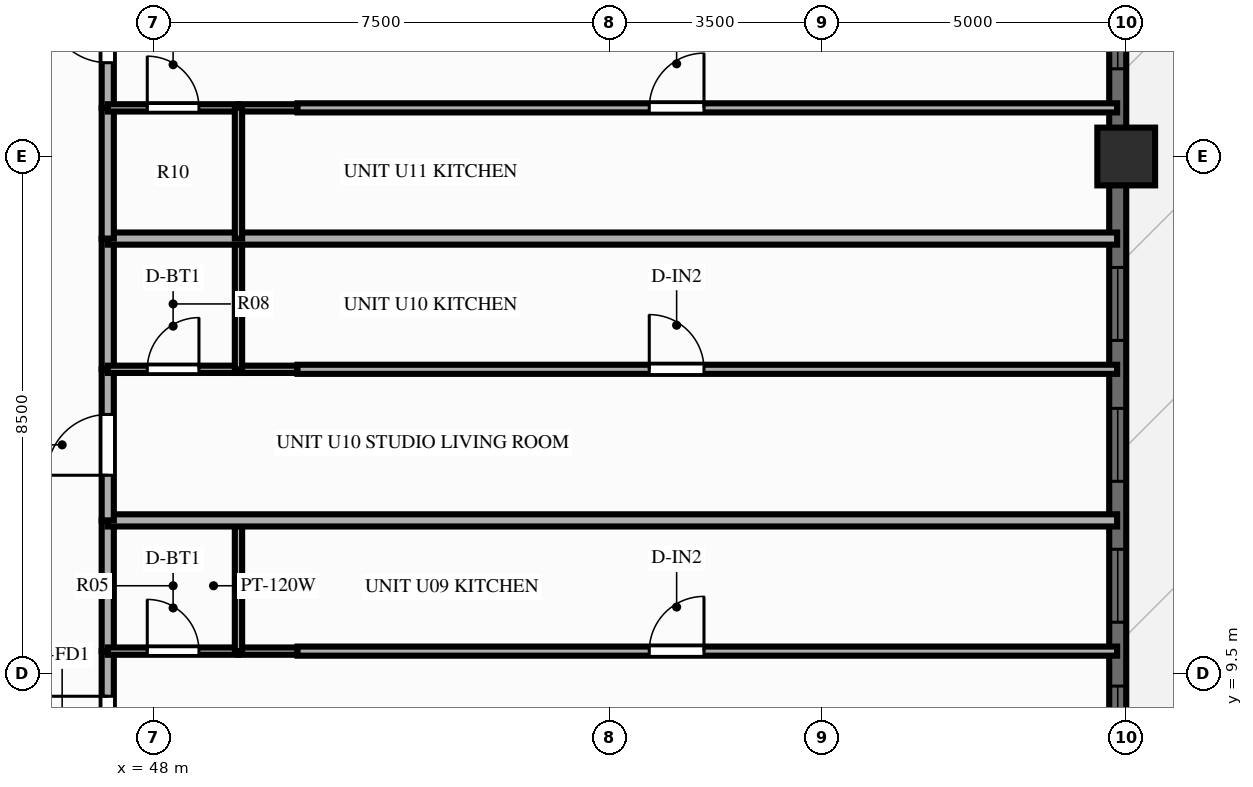
"""IFC4 building model, lengths in metres.
Left out: names, types, materials, properties, quantities, classifications, styles, units other than length and angle.
Written with IfcOpenShell. Run it as: python <this file> out.ifc"""

import sys

from ifc_helpers import new_model, si_unit, direction, frame, frame_2d, origin, origin_2d, place, context, subcontext, project, spatial, rectangle, extrude, source, transform, mapped, element, fill, save


model = new_model("IFC4")
c1 = context("Model", 3, precision=1e-05, world=origin(), true_north=direction((0.0, 1.0)))
c2 = subcontext(c1, "Body", "Model", "MODEL_VIEW")
j1 = project(units=[si_unit("LENGTHUNIT", "METRE"), si_unit("PLANEANGLEUNIT", "RADIAN")], contexts=[c1])
p1 = place(None, origin())
s1 = spatial("IfcSite", under=j1, at=p1, CompositionType="ELEMENT")
p2 = place(p1, origin())
s2 = spatial("IfcBuilding", under=s1, at=p2, CompositionType="ELEMENT")
p3 = place(p2, frame((0.0, 0.0, 122.85)))
s3 = spatial("IfcBuildingStorey", under=s2, at=p3, CompositionType="ELEMENT", Elevation=122.85)
m1 = source(origin(), c2, "Body", "SweptSolid", [
    extrude(rectangle(XDim=0.95, YDim=0.95, at=origin_2d()), origin(), (0.0, 0.0, 1.0), 3.9),
])
p4 = place(p3, frame((64.0, 18.0, 0.0), z_axis=(0.0, 0.0, 1.0), x_axis=(1.0, 0.0, 0.0)))
e1 = element("IfcColumn", 1, at=p4, inside=s3, PredefinedType="COLUMN", context=c2, shape_type="MappedRepresentation", body=[
    mapped(m1, transform((0.0, 0.0, 0.0), scale=1.0)),
])
p5 = place(p3, frame((63.86, 7.2, 0.0), z_axis=(0.0, 0.0, 1.0), x_axis=(0.0, 1.0, 0.0)))
e2 = element("IfcWall", 2, at=p5, inside=s3, PredefinedType="SOLIDWALL", context=c2, shape_type="SweptSolid", body=[
    extrude(rectangle(XDim=39.6, YDim=0.28, at=frame_2d((19.8, 0.0))), origin(), (0.0, 0.0, 1.0), 2.24),
])
p6 = place(p5, frame((0.89, 0.0, 0.25)))
e3 = element("IfcOpeningElement", 3, at=p6, cuts=e2, PredefinedType="OPENING", context=c2, shape_type="SweptSolid", body=[
    extrude(rectangle(XDim=1.2, YDim=1.5, at=frame_2d((0.6, 0.75))), frame((0.0, 0.152, 0.0), z_axis=(0.0, -1.0, 0.0), x_axis=(1.0, 0.0, 0.0)), (0.0, 0.0, 1.0), 0.304),
])
p7 = place(p5, frame((3.14, 0.0, 0.25)))
e4 = element("IfcOpeningElement", 4, at=p7, cuts=e2, PredefinedType="OPENING", context=c2, shape_type="SweptSolid", body=[
    extrude(rectangle(XDim=1.2, YDim=1.5, at=frame_2d((0.6, 0.75))), frame((0.0, 0.152, 0.0), z_axis=(0.0, -1.0, 0.0), x_axis=(1.0, 0.0, 0.0)), (0.0, 0.0, 1.0), 0.304),
])
p8 = place(p5, frame((5.458, 0.0, 0.25)))
e5 = element("IfcOpeningElement", 5, at=p8, cuts=e2, PredefinedType="OPENING", context=c2, shape_type="SweptSolid", body=[
    extrude(rectangle(XDim=1.2, YDim=1.5, at=frame_2d((0.6, 0.75))), frame((0.0, 0.152, 0.0), z_axis=(0.0, -1.0, 0.0), x_axis=(1.0, 0.0, 0.0)), (0.0, 0.0, 1.0), 0.304),
])
p9 = place(p5, frame((7.775, 0.0, 0.25)))
e6 = element("IfcOpeningElement", 6, at=p9, cuts=e2, PredefinedType="OPENING", context=c2, shape_type="SweptSolid", body=[
    extrude(rectangle(XDim=1.2, YDim=1.5, at=frame_2d((0.6, 0.75))), frame((0.0, 0.152, 0.0), z_axis=(0.0, -1.0, 0.0), x_axis=(1.0, 0.0, 0.0)), (0.0, 0.0, 1.0), 0.304),
])
p10 = place(p5, frame((12.242, 0.0, 0.25)))
e7 = element("IfcOpeningElement", 7, at=p10, cuts=e2, PredefinedType="OPENING", context=c2, shape_type="SweptSolid", body=[
    extrude(rectangle(XDim=1.2, YDim=1.5, at=frame_2d((0.6, 0.75))), frame((0.0, 0.152, 0.0), z_axis=(0.0, -1.0, 0.0), x_axis=(1.0, 0.0, 0.0)), (0.0, 0.0, 1.0), 0.304),
])
p11 = place(p5, frame((14.56, 0.0, 0.25)))
e8 = element("IfcOpeningElement", 8, at=p11, cuts=e2, PredefinedType="OPENING", context=c2, shape_type="SweptSolid", body=[
    extrude(rectangle(XDim=1.2, YDim=1.5, at=frame_2d((0.6, 0.75))), frame((0.0, 0.152, 0.0), z_axis=(0.0, -1.0, 0.0), x_axis=(1.0, 0.0, 0.0)), (0.0, 0.0, 1.0), 0.304),
])
p12 = place(p5, frame((16.877, 0.0, 0.25)))
e9 = element("IfcOpeningElement", 9, at=p12, cuts=e2, PredefinedType="OPENING", context=c2, shape_type="SweptSolid", body=[
    extrude(rectangle(XDim=1.2, YDim=1.5, at=frame_2d((0.6, 0.75))), frame((0.0, 0.152, 0.0), z_axis=(0.0, -1.0, 0.0), x_axis=(1.0, 0.0, 0.0)), (0.0, 0.0, 1.0), 0.304),
])
p13 = place(p5, frame((20.35, 0.0, 0.0), z_axis=(0.0, 0.0, 1.0), x_axis=(-1.0, 0.0, 0.0)))
e10 = element("IfcOpeningElement", 10, at=p13, cuts=e2, PredefinedType="OPENING", context=c2, shape_type="SweptSolid", body=[
    extrude(rectangle(XDim=1.1, YDim=2.15, at=frame_2d((0.55, 1.075))), frame((0.0, 0.152, 0.0), z_axis=(0.0, -1.0, 0.0), x_axis=(1.0, 0.0, 0.0)), (0.0, 0.0, 1.0), 0.304),
])
p14 = place(p5, frame((21.522, 0.0, 0.25)))
e11 = element("IfcOpeningElement", 11, at=p14, cuts=e2, PredefinedType="OPENING", context=c2, shape_type="SweptSolid", body=[
    extrude(rectangle(XDim=1.2, YDim=1.5, at=frame_2d((0.6, 0.75))), frame((0.0, 0.152, 0.0), z_axis=(0.0, -1.0, 0.0), x_axis=(1.0, 0.0, 0.0)), (0.0, 0.0, 1.0), 0.304),
])
p15 = place(p5, frame((23.84, 0.0, 0.25)))
e12 = element("IfcOpeningElement", 12, at=p15, cuts=e2, PredefinedType="OPENING", context=c2, shape_type="SweptSolid", body=[
    extrude(rectangle(XDim=1.2, YDim=1.5, at=frame_2d((0.6, 0.75))), frame((0.0, 0.152, 0.0), z_axis=(0.0, -1.0, 0.0), x_axis=(1.0, 0.0, 0.0)), (0.0, 0.0, 1.0), 0.304),
])
p16 = place(p5, frame((26.157, 0.0, 0.25)))
e13 = element("IfcOpeningElement", 13, at=p16, cuts=e2, PredefinedType="OPENING", context=c2, shape_type="SweptSolid", body=[
    extrude(rectangle(XDim=1.2, YDim=1.5, at=frame_2d((0.6, 0.75))), frame((0.0, 0.152, 0.0), z_axis=(0.0, -1.0, 0.0), x_axis=(1.0, 0.0, 0.0)), (0.0, 0.0, 1.0), 0.304),
])
p17 = place(p5, frame((30.625, 0.0, 0.25)))
e14 = element("IfcOpeningElement", 14, at=p17, cuts=e2, PredefinedType="OPENING", context=c2, shape_type="SweptSolid", body=[
    extrude(rectangle(XDim=1.2, YDim=1.5, at=frame_2d((0.6, 0.75))), frame((0.0, 0.152, 0.0), z_axis=(0.0, -1.0, 0.0), x_axis=(1.0, 0.0, 0.0)), (0.0, 0.0, 1.0), 0.304),
])
p18 = place(p5, frame((32.942, 0.0, 0.25)))
e15 = element("IfcOpeningElement", 15, at=p18, cuts=e2, PredefinedType="OPENING", context=c2, shape_type="SweptSolid", body=[
    extrude(rectangle(XDim=1.2, YDim=1.5, at=frame_2d((0.6, 0.75))), frame((0.0, 0.152, 0.0), z_axis=(0.0, -1.0, 0.0), x_axis=(1.0, 0.0, 0.0)), (0.0, 0.0, 1.0), 0.304),
])
p19 = place(p5, frame((35.26, 0.0, 0.25)))
e16 = element("IfcOpeningElement", 16, at=p19, cuts=e2, PredefinedType="OPENING", context=c2, shape_type="SweptSolid", body=[
    extrude(rectangle(XDim=1.2, YDim=1.5, at=frame_2d((0.6, 0.75))), frame((0.0, 0.152, 0.0), z_axis=(0.0, -1.0, 0.0), x_axis=(1.0, 0.0, 0.0)), (0.0, 0.0, 1.0), 0.304),
])
p20 = place(p5, frame((37.51, 0.0, 0.25)))
e17 = element("IfcOpeningElement", 17, at=p20, cuts=e2, PredefinedType="OPENING", context=c2, shape_type="SweptSolid", body=[
    extrude(rectangle(XDim=1.2, YDim=1.5, at=frame_2d((0.6, 0.75))), frame((0.0, 0.152, 0.0), z_axis=(0.0, -1.0, 0.0), x_axis=(1.0, 0.0, 0.0)), (0.0, 0.0, 1.0), 0.304),
])
p21 = place(p3, frame((47.25, 7.38, 0.0), z_axis=(0.0, 0.0, 1.0), x_axis=(0.0, 1.0, 0.0)))
e18 = element("IfcWall", 18, at=p21, inside=s3, PredefinedType="PARTITIONING", context=c2, shape_type="SweptSolid", body=[
    extrude(rectangle(XDim=2.485, YDim=0.2, at=frame_2d((1.243, 0.0))), origin(), (0.0, 0.0, 1.0), 3.56),
])
p22 = place(p21, frame((0.742, 0.0, 0.0)))
e19 = element("IfcOpeningElement", 19, at=p22, cuts=e18, PredefinedType="OPENING", context=c2, shape_type="SweptSolid", body=[
    extrude(rectangle(XDim=1.0, YDim=2.15, at=frame_2d((0.5, 1.075))), frame((0.0, 0.112, 0.0), z_axis=(0.0, -1.0, 0.0), x_axis=(1.0, 0.0, 0.0)), (0.0, 0.0, 1.0), 0.224),
])
p23 = place(p3, frame((47.25, 9.865, 0.0), z_axis=(0.0, 0.0, 1.0), x_axis=(0.0, 1.0, 0.0)))
e20 = element("IfcWall", 20, at=p23, inside=s3, PredefinedType="PARTITIONING", context=c2, shape_type="SweptSolid", body=[
    extrude(rectangle(XDim=2.15, YDim=0.2, at=frame_2d((1.075, 0.0))), origin(), (0.0, 0.0, 1.0), 3.56),
])
p24 = place(p3, frame((47.25, 9.865, 0.0), z_axis=(0.0, 0.0, 1.0), x_axis=(1.0, 0.0, 0.0)))
e21 = element("IfcWall", 21, at=p24, inside=s3, PredefinedType="PARTITIONING", context=c2, shape_type="SweptSolid", body=[
    extrude(rectangle(XDim=2.15, YDim=0.12, at=frame_2d((1.075, 0.0))), origin(), (0.0, 0.0, 1.0), 3.56),
])
p25 = place(p24, frame((0.65, 0.0, 0.0)))
e22 = element("IfcOpeningElement", 22, at=p25, cuts=e21, PredefinedType="OPENING", context=c2, shape_type="SweptSolid", body=[
    extrude(rectangle(XDim=0.85, YDim=2.05, at=frame_2d((0.425, 1.025))), frame((0.0, 0.072, 0.0), z_axis=(0.0, -1.0, 0.0), x_axis=(1.0, 0.0, 0.0)), (0.0, 0.0, 1.0), 0.144),
])
p26 = place(p3, frame((49.4, 9.865, 0.0), z_axis=(0.0, 0.0, 1.0), x_axis=(1.0, 0.0, 0.0)))
e23 = element("IfcWall", 23, at=p26, inside=s3, PredefinedType="PARTITIONING", context=c2, shape_type="SweptSolid", body=[
    extrude(rectangle(XDim=0.97, YDim=0.12, at=frame_2d((0.485, 0.0))), origin(), (0.0, 0.0, 1.0), 3.56),
])
p27 = place(p3, frame((49.4, 9.865, 0.0), z_axis=(0.0, 0.0, 1.0), x_axis=(0.0, 1.0, 0.0)))
e24 = element("IfcWall", 24, at=p27, inside=s3, PredefinedType="PARTITIONING", context=c2, shape_type="SweptSolid", body=[
    extrude(rectangle(XDim=2.15, YDim=0.12, at=frame_2d((1.075, 0.0))), origin(), (0.0, 0.0, 1.0), 3.56),
])
p28 = place(p3, frame((50.37, 9.865, 0.0), z_axis=(0.0, 0.0, 1.0), x_axis=(1.0, 0.0, 0.0)))
e25 = element("IfcWall", 25, at=p28, inside=s3, PredefinedType="PARTITIONING", context=c2, shape_type="SweptSolid", body=[
    extrude(rectangle(XDim=13.48, YDim=0.15, at=frame_2d((6.74, 0.0))), origin(), (0.0, 0.0, 1.0), 3.56),
])
p29 = place(p28, frame((5.786, 0.0, 0.0)))
e26 = element("IfcOpeningElement", 26, at=p29, cuts=e25, PredefinedType="OPENING", context=c2, shape_type="SweptSolid", body=[
    extrude(rectangle(XDim=0.9, YDim=2.1, at=frame_2d((0.45, 1.05))), frame((0.0, 0.087, 0.0), z_axis=(0.0, -1.0, 0.0), x_axis=(1.0, 0.0, 0.0)), (0.0, 0.0, 1.0), 0.174),
])
p30 = place(p3, frame((47.25, 12.015, 0.0), z_axis=(0.0, 0.0, 1.0), x_axis=(1.0, 0.0, 0.0)))
e27 = element("IfcWall", 27, at=p30, inside=s3, PredefinedType="PARTITIONING", context=c2, shape_type="SweptSolid", body=[
    extrude(rectangle(XDim=16.6, YDim=0.2, at=frame_2d((8.3, 0.0))), origin(), (0.0, 0.0, 1.0), 3.56),
])
p31 = place(p3, frame((47.25, 12.015, 0.0), z_axis=(0.0, 0.0, 1.0), x_axis=(0.0, 1.0, 0.0)))
e28 = element("IfcWall", 28, at=p31, inside=s3, PredefinedType="PARTITIONING", context=c2, shape_type="SweptSolid", body=[
    extrude(rectangle(XDim=2.485, YDim=0.2, at=frame_2d((1.243, 0.0))), origin(), (0.0, 0.0, 1.0), 3.56),
])
p32 = place(p31, frame((0.742, 0.0, 0.0)))
e29 = element("IfcOpeningElement", 29, at=p32, cuts=e28, PredefinedType="OPENING", context=c2, shape_type="SweptSolid", body=[
    extrude(rectangle(XDim=1.0, YDim=2.15, at=frame_2d((0.5, 1.075))), frame((0.0, 0.112, 0.0), z_axis=(0.0, -1.0, 0.0), x_axis=(1.0, 0.0, 0.0)), (0.0, 0.0, 1.0), 0.224),
])
p33 = place(p3, frame((47.25, 14.5, 0.0), z_axis=(0.0, 0.0, 1.0), x_axis=(0.0, 1.0, 0.0)))
e30 = element("IfcWall", 30, at=p33, inside=s3, PredefinedType="PARTITIONING", context=c2, shape_type="SweptSolid", body=[
    extrude(rectangle(XDim=2.15, YDim=0.2, at=frame_2d((1.075, 0.0))), origin(), (0.0, 0.0, 1.0), 3.56),
])
p34 = place(p3, frame((47.25, 14.5, 0.0), z_axis=(0.0, 0.0, 1.0), x_axis=(1.0, 0.0, 0.0)))
e31 = element("IfcWall", 31, at=p34, inside=s3, PredefinedType="PARTITIONING", context=c2, shape_type="SweptSolid", body=[
    extrude(rectangle(XDim=2.15, YDim=0.12, at=frame_2d((1.075, 0.0))), origin(), (0.0, 0.0, 1.0), 3.56),
])
p35 = place(p34, frame((0.65, 0.0, 0.0)))
e32 = element("IfcOpeningElement", 32, at=p35, cuts=e31, PredefinedType="OPENING", context=c2, shape_type="SweptSolid", body=[
    extrude(rectangle(XDim=0.85, YDim=2.05, at=frame_2d((0.425, 1.025))), frame((0.0, 0.072, 0.0), z_axis=(0.0, -1.0, 0.0), x_axis=(1.0, 0.0, 0.0)), (0.0, 0.0, 1.0), 0.144),
])
p36 = place(p3, frame((49.4, 14.5, 0.0), z_axis=(0.0, 0.0, 1.0), x_axis=(1.0, 0.0, 0.0)))
e33 = element("IfcWall", 33, at=p36, inside=s3, PredefinedType="PARTITIONING", context=c2, shape_type="SweptSolid", body=[
    extrude(rectangle(XDim=0.97, YDim=0.12, at=frame_2d((0.485, 0.0))), origin(), (0.0, 0.0, 1.0), 3.56),
])
p37 = place(p3, frame((49.4, 14.5, 0.0), z_axis=(0.0, 0.0, 1.0), x_axis=(0.0, 1.0, 0.0)))
e34 = element("IfcWall", 34, at=p37, inside=s3, PredefinedType="PARTITIONING", context=c2, shape_type="SweptSolid", body=[
    extrude(rectangle(XDim=2.15, YDim=0.12, at=frame_2d((1.075, 0.0))), origin(), (0.0, 0.0, 1.0), 3.56),
])
p38 = place(p3, frame((50.37, 14.5, 0.0), z_axis=(0.0, 0.0, 1.0), x_axis=(1.0, 0.0, 0.0)))
e35 = element("IfcWall", 35, at=p38, inside=s3, PredefinedType="PARTITIONING", context=c2, shape_type="SweptSolid", body=[
    extrude(rectangle(XDim=13.48, YDim=0.15, at=frame_2d((6.74, 0.0))), origin(), (0.0, 0.0, 1.0), 3.56),
])
p39 = place(p38, frame((5.786, 0.0, 0.0)))
e36 = element("IfcOpeningElement", 36, at=p39, cuts=e35, PredefinedType="OPENING", context=c2, shape_type="SweptSolid", body=[
    extrude(rectangle(XDim=0.9, YDim=2.1, at=frame_2d((0.45, 1.05))), frame((0.0, 0.087, 0.0), z_axis=(0.0, -1.0, 0.0), x_axis=(1.0, 0.0, 0.0)), (0.0, 0.0, 1.0), 0.174),
])
p40 = place(p3, frame((47.25, 16.65, 0.0), z_axis=(0.0, 0.0, 1.0), x_axis=(1.0, 0.0, 0.0)))
e37 = element("IfcWall", 37, at=p40, inside=s3, PredefinedType="PARTITIONING", context=c2, shape_type="SweptSolid", body=[
    extrude(rectangle(XDim=16.6, YDim=0.2, at=frame_2d((8.3, 0.0))), origin(), (0.0, 0.0, 1.0), 3.56),
])
p41 = place(p3, frame((47.25, 16.65, 0.0), z_axis=(0.0, 0.0, 1.0), x_axis=(0.0, 1.0, 0.0)))
e38 = element("IfcWall", 38, at=p41, inside=s3, PredefinedType="PARTITIONING", context=c2, shape_type="SweptSolid", body=[
    extrude(rectangle(XDim=2.15, YDim=0.2, at=frame_2d((1.075, 0.0))), origin(), (0.0, 0.0, 1.0), 3.56),
])
p42 = place(p3, frame((47.25, 18.8, 0.0), z_axis=(0.0, 0.0, 1.0), x_axis=(0.0, 1.0, 0.0)))
e39 = element("IfcWall", 39, at=p42, inside=s3, PredefinedType="PARTITIONING", context=c2, shape_type="SweptSolid", body=[
    extrude(rectangle(XDim=2.485, YDim=0.2, at=frame_2d((1.242, 0.0))), origin(), (0.0, 0.0, 1.0), 3.56),
])
p43 = place(p42, frame((0.742, 0.0, 0.0)))
e40 = element("IfcOpeningElement", 40, at=p43, cuts=e39, PredefinedType="OPENING", context=c2, shape_type="SweptSolid", body=[
    extrude(rectangle(XDim=1.0, YDim=2.15, at=frame_2d((0.5, 1.075))), frame((0.0, 0.112, 0.0), z_axis=(0.0, -1.0, 0.0), x_axis=(1.0, 0.0, 0.0)), (0.0, 0.0, 1.0), 0.224),
])
p44 = place(p3, frame((47.25, 18.8, 0.0), z_axis=(0.0, 0.0, 1.0), x_axis=(1.0, 0.0, 0.0)))
e41 = element("IfcWall", 41, at=p44, inside=s3, PredefinedType="PARTITIONING", context=c2, shape_type="SweptSolid", body=[
    extrude(rectangle(XDim=2.15, YDim=0.12, at=frame_2d((1.075, 0.0))), origin(), (0.0, 0.0, 1.0), 3.56),
])
p45 = place(p44, frame((0.65, 0.0, 0.0)))
e42 = element("IfcOpeningElement", 42, at=p45, cuts=e41, PredefinedType="OPENING", context=c2, shape_type="SweptSolid", body=[
    extrude(rectangle(XDim=0.85, YDim=2.05, at=frame_2d((0.425, 1.025))), frame((0.0, 0.072, 0.0), z_axis=(0.0, -1.0, 0.0), x_axis=(1.0, 0.0, 0.0)), (0.0, 0.0, 1.0), 0.144),
])
p46 = place(p3, frame((49.4, 18.8, 0.0), z_axis=(0.0, 0.0, 1.0), x_axis=(1.0, 0.0, 0.0)))
e43 = element("IfcWall", 43, at=p46, inside=s3, PredefinedType="PARTITIONING", context=c2, shape_type="SweptSolid", body=[
    extrude(rectangle(XDim=0.97, YDim=0.12, at=frame_2d((0.485, 0.0))), origin(), (0.0, 0.0, 1.0), 3.56),
])
p47 = place(p3, frame((49.4, 16.65, 0.0), z_axis=(0.0, 0.0, 1.0), x_axis=(0.0, 1.0, 0.0)))
e44 = element("IfcWall", 44, at=p47, inside=s3, PredefinedType="PARTITIONING", context=c2, shape_type="SweptSolid", body=[
    extrude(rectangle(XDim=2.15, YDim=0.12, at=frame_2d((1.075, 0.0))), origin(), (0.0, 0.0, 1.0), 3.56),
])
p48 = place(p3, frame((50.37, 18.8, 0.0), z_axis=(0.0, 0.0, 1.0), x_axis=(1.0, 0.0, 0.0)))
e45 = element("IfcWall", 45, at=p48, inside=s3, PredefinedType="PARTITIONING", context=c2, shape_type="SweptSolid", body=[
    extrude(rectangle(XDim=13.48, YDim=0.15, at=frame_2d((6.74, 0.0))), origin(), (0.0, 0.0, 1.0), 3.56),
])
p49 = place(p48, frame((5.786, 0.0, 0.0)))
e46 = element("IfcOpeningElement", 46, at=p49, cuts=e45, PredefinedType="OPENING", context=c2, shape_type="SweptSolid", body=[
    extrude(rectangle(XDim=0.9, YDim=2.1, at=frame_2d((0.45, 1.05))), frame((0.0, 0.087, 0.0), z_axis=(0.0, -1.0, 0.0), x_axis=(1.0, 0.0, 0.0)), (0.0, 0.0, 1.0), 0.174),
])
m2 = source(origin(), c2, "Body", "SweptSolid", [
    extrude(rectangle(XDim=1.2, YDim=1.5, at=frame_2d((0.6, 0.75))), frame((0.0, 0.03, 0.0), z_axis=(0.0, -1.0, 0.0), x_axis=(1.0, 0.0, 0.0)), (0.0, 0.0, 1.0), 0.06),
])
p50 = place(p6, origin())
e47 = element("IfcWindow", 47, at=p50, inside=s3, PartitioningType="SINGLE_PANEL", PredefinedType="WINDOW", context=c2, shape_type="MappedRepresentation", body=[
    mapped(m2, transform((0.0, 0.0, 0.0), scale=1.0)),
])
fill(e3, e47)
p51 = place(p7, origin())
e48 = element("IfcWindow", 48, at=p51, inside=s3, PartitioningType="SINGLE_PANEL", PredefinedType="WINDOW", context=c2, shape_type="MappedRepresentation", body=[
    mapped(m2, transform((0.0, 0.0, 0.0), scale=1.0)),
])
fill(e4, e48)
p52 = place(p8, origin())
e49 = element("IfcWindow", 49, at=p52, inside=s3, PartitioningType="SINGLE_PANEL", PredefinedType="WINDOW", context=c2, shape_type="MappedRepresentation", body=[
    mapped(m2, transform((0.0, 0.0, 0.0), scale=1.0)),
])
fill(e5, e49)
p53 = place(p9, origin())
e50 = element("IfcWindow", 50, at=p53, inside=s3, PartitioningType="SINGLE_PANEL", PredefinedType="WINDOW", context=c2, shape_type="MappedRepresentation", body=[
    mapped(m2, transform((0.0, 0.0, 0.0), scale=1.0)),
])
fill(e6, e50)
p54 = place(p10, origin())
e51 = element("IfcWindow", 51, at=p54, inside=s3, PartitioningType="SINGLE_PANEL", PredefinedType="WINDOW", context=c2, shape_type="MappedRepresentation", body=[
    mapped(m2, transform((0.0, 0.0, 0.0), scale=1.0)),
])
fill(e7, e51)
m3 = source(origin(), c2, "Body", "SweptSolid", [
    extrude(rectangle(XDim=1.0, YDim=2.15, at=frame_2d((0.5, 1.075))), frame((0.0, 0.025, 0.0), z_axis=(0.0, -1.0, 0.0), x_axis=(1.0, 0.0, 0.0)), (0.0, 0.0, 1.0), 0.05),
])
p55 = place(p22, origin())
e52 = element("IfcDoor", 52, at=p55, inside=s3, OperationType="SINGLE_SWING_RIGHT", PredefinedType="DOOR", context=c2, shape_type="MappedRepresentation", body=[
    mapped(m3, transform((0.0, 0.0, 0.0), scale=1.0)),
])
fill(e19, e52)
m4 = source(origin(), c2, "Body", "SweptSolid", [
    extrude(rectangle(XDim=0.85, YDim=2.05, at=frame_2d((0.425, 1.025))), frame((0.0, 0.025, 0.0), z_axis=(0.0, -1.0, 0.0), x_axis=(1.0, 0.0, 0.0)), (0.0, 0.0, 1.0), 0.05),
])
p56 = place(p25, origin())
e53 = element("IfcDoor", 53, at=p56, inside=s3, OperationType="SINGLE_SWING_LEFT", PredefinedType="DOOR", context=c2, shape_type="MappedRepresentation", body=[
    mapped(m4, transform((0.0, 0.0, 0.0), scale=1.0)),
])
fill(e22, e53)
m5 = source(origin(), c2, "Body", "SweptSolid", [
    extrude(rectangle(XDim=0.9, YDim=2.1, at=frame_2d((0.45, 1.05))), frame((0.0, 0.025, 0.0), z_axis=(0.0, -1.0, 0.0), x_axis=(1.0, 0.0, 0.0)), (0.0, 0.0, 1.0), 0.05),
])
p57 = place(p29, origin())
e54 = element("IfcDoor", 54, at=p57, inside=s3, OperationType="SINGLE_SWING_RIGHT", PredefinedType="DOOR", context=c2, shape_type="MappedRepresentation", body=[
    mapped(m5, transform((0.0, 0.0, 0.0), scale=1.0)),
])
fill(e26, e54)
p58 = place(p32, origin())
e55 = element("IfcDoor", 55, at=p58, inside=s3, OperationType="SINGLE_SWING_LEFT", PredefinedType="DOOR", context=c2, shape_type="MappedRepresentation", body=[
    mapped(m3, transform((0.0, 0.0, 0.0), scale=1.0)),
])
fill(e29, e55)
p59 = place(p35, origin())
e56 = element("IfcDoor", 56, at=p59, inside=s3, OperationType="SINGLE_SWING_RIGHT", PredefinedType="DOOR", context=c2, shape_type="MappedRepresentation", body=[
    mapped(m4, transform((0.0, 0.0, 0.0), scale=1.0)),
])
fill(e32, e56)
p60 = place(p39, origin())
e57 = element("IfcDoor", 57, at=p60, inside=s3, OperationType="SINGLE_SWING_LEFT", PredefinedType="DOOR", context=c2, shape_type="MappedRepresentation", body=[
    mapped(m5, transform((0.0, 0.0, 0.0), scale=1.0)),
])
fill(e36, e57)
p61 = place(p43, origin())
e58 = element("IfcDoor", 58, at=p61, inside=s3, OperationType="SINGLE_SWING_RIGHT", PredefinedType="DOOR", context=c2, shape_type="MappedRepresentation", body=[
    mapped(m3, transform((0.0, 0.0, 0.0), scale=1.0)),
])
fill(e40, e58)
p62 = place(p45, origin())
e59 = element("IfcDoor", 59, at=p62, inside=s3, OperationType="SINGLE_SWING_LEFT", PredefinedType="DOOR", context=c2, shape_type="MappedRepresentation", body=[
    mapped(m4, transform((0.0, 0.0, 0.0), scale=1.0)),
])
fill(e42, e59)
p63 = place(p49, origin())
e60 = element("IfcDoor", 60, at=p63, inside=s3, OperationType="SINGLE_SWING_RIGHT", PredefinedType="DOOR", context=c2, shape_type="MappedRepresentation", body=[
    mapped(m5, transform((0.0, 0.0, 0.0), scale=1.0)),
])
fill(e46, e60)
save(model, sys.argv[1])
